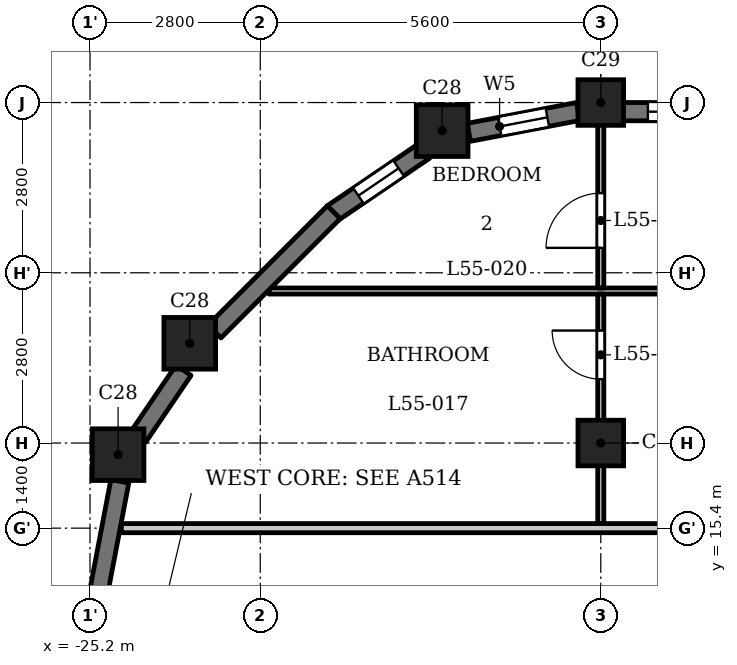
"""IFC4 building model, lengths in metres.
Left out: names, types, materials, properties, quantities, classifications, styles, units other than length and angle.
Written with IfcOpenShell. Run it as: python <this file> out.ifc"""

import sys

from ifc_helpers import new_model, si_unit, direction, frame, frame_2d, origin, origin_2d, place, context, subcontext, project, spatial, rectangle, extrude, element, fill, save


model = new_model("IFC4")
c1 = context("Model", 3, precision=1e-05, world=origin(), true_north=direction((0.0, 1.0)))
c2 = subcontext(c1, "Body", "Model", "MODEL_VIEW")
j1 = project(units=[si_unit("LENGTHUNIT", "METRE"), si_unit("PLANEANGLEUNIT", "RADIAN")], contexts=[c1])
p1 = place(None, origin())
s1 = spatial("IfcSite", under=j1, at=p1, CompositionType="ELEMENT")
p2 = place(p1, origin())
s2 = spatial("IfcBuilding", under=s1, at=p2, CompositionType="ELEMENT")
p3 = place(p2, frame((0.0, 0.0, 213.4)))
s3 = spatial("IfcBuildingStorey", under=s2, at=p3, CompositionType="ELEMENT", Elevation=213.4)
for number, where, z_axis, x_axis in (
    (1, (-19.409, 21.938, 0.0), (0.0, 0.0, 1.0), (1.0, 0.0, 0.0)),
    (2, (-23.56, 18.44, 0.0), (0.0, 0.0, 1.0), (1.0, 0.0, 0.0)),
    (3, (-24.738, 16.609, 0.0), (0.0, 0.0, 1.0), (1.0, 0.0, 0.0)),
):
    element("IfcColumn", number, at=place(p3, frame(where, z_axis=z_axis, x_axis=x_axis)), inside=s3, PredefinedType="COLUMN", context=c2, shape_type="SweptSolid", body=[
        extrude(rectangle(XDim=0.85, YDim=0.85, at=origin_2d()), origin(), (0.0, 0.0, 1.0), 3.5),
    ])
for number, where, z_axis, x_axis in (
    (4, (-16.8, 16.8, 0.0), (0.0, 0.0, 1.0), (1.0, 0.0, 0.0)),
    (5, (-16.8, 22.4, 0.0), (0.0, 0.0, 1.0), (1.0, 0.0, 0.0)),
):
    element("IfcColumn", number, at=place(p3, frame(where, z_axis=z_axis, x_axis=x_axis)), inside=s3, PredefinedType="COLUMN", context=c2, shape_type="SweptSolid", body=[
        extrude(rectangle(XDim=0.75, YDim=0.75, at=origin_2d()), origin(), (0.0, 0.0, 1.0), 3.5),
    ])
p4 = place(p3, frame((-14.425, 22.25, 0.0), z_axis=(0.0, 0.0, 1.0), x_axis=(-1.0, 0.0, 0.0)))
e6 = element("IfcWall", 6, at=p4, inside=s3, PredefinedType="SOLIDWALL", context=c2, shape_type="SweptSolid", body=[
    extrude(rectangle(XDim=2.0, YDim=0.3, at=frame_2d((1.0, 0.0))), origin(), (0.0, 0.0, 1.0), 2.5),
])
p5 = place(p4, frame((0.4, 0.0, 0.6)))
e7 = element("IfcOpeningElement", 7, at=p5, cuts=e6, PredefinedType="OPENING", context=c2, shape_type="SweptSolid", body=[
    extrude(rectangle(XDim=1.2, YDim=1.55, at=frame_2d((0.6, 0.775))), frame((0.0, 0.16, 0.0), z_axis=(0.0, -1.0, 0.0), x_axis=(1.0, 0.0, 0.0)), (0.0, 0.0, 1.0), 0.32),
])
p6 = place(p3, frame((-17.172, 22.253, 0.0), z_axis=(0.0, 0.0, 1.0), x_axis=(-0.982300037503, -0.187314271538, 0.0)))
e8 = element("IfcWall", 8, at=p6, inside=s3, PredefinedType="SOLIDWALL", context=c2, shape_type="SweptSolid", body=[
    extrude(rectangle(XDim=1.831, YDim=0.3, at=frame_2d((0.916, 0.0))), origin(), (0.0, 0.0, 1.0), 2.5),
])
p7 = place(p6, frame((0.516, 0.0, 0.6)))
e9 = element("IfcOpeningElement", 9, at=p7, cuts=e8, PredefinedType="OPENING", context=c2, shape_type="SweptSolid", body=[
    extrude(rectangle(XDim=0.8, YDim=1.55, at=frame_2d((0.4, 0.775))), frame((0.0, 0.16, 0.0), z_axis=(0.0, -1.0, 0.0), x_axis=(1.0, 0.0, 0.0)), (0.0, 0.0, 1.0), 0.32),
])
p8 = place(p3, frame((-19.698, 21.608, 0.0), z_axis=(0.0, 0.0, 1.0), x_axis=(-0.82705295608, -0.562124014644, 0.0)))
e10 = element("IfcWall", 10, at=p8, inside=s3, PredefinedType="SOLIDWALL", context=c2, shape_type="SweptSolid", body=[
    extrude(rectangle(XDim=1.831, YDim=0.3, at=frame_2d((0.916, 0.0))), origin(), (0.0, 0.0, 1.0), 2.5),
])
p9 = place(p8, frame((0.516, 0.0, 0.6)))
e11 = element("IfcOpeningElement", 11, at=p9, cuts=e10, PredefinedType="OPENING", context=c2, shape_type="SweptSolid", body=[
    extrude(rectangle(XDim=0.8, YDim=1.55, at=frame_2d((0.4, 0.775))), frame((0.0, 0.16, 0.0), z_axis=(0.0, -1.0, 0.0), x_axis=(1.0, 0.0, 0.0)), (0.0, 0.0, 1.0), 0.32),
])
p10 = place(p3, frame((-21.191, 20.597, 0.0), z_axis=(0.0, 0.0, 1.0), x_axis=(-0.707150767798, -0.707062791838, 0.0)))
e12 = element("IfcWall", 12, at=p10, inside=s3, PredefinedType="SOLIDWALL", context=c2, shape_type="SweptSolid", body=[
    extrude(rectangle(XDim=2.775, YDim=0.3, at=frame_2d((1.388, 0.0))), origin(), (0.0, 0.0, 1.0), 2.5),
])
p11 = place(p3, frame((-23.662, 17.996, 0.0), z_axis=(0.0, 0.0, 1.0), x_axis=(-0.562149004813, -0.827035970432, 0.0)))
e13 = element("IfcWall", 13, at=p11, inside=s3, PredefinedType="SOLIDWALL", context=c2, shape_type="SweptSolid", body=[
    extrude(rectangle(XDim=1.327, YDim=0.3, at=frame_2d((0.664, 0.0))), origin(), (0.0, 0.0, 1.0), 2.5),
])
p12 = place(p3, frame((-24.709, 16.171, 0.0), z_axis=(0.0, 0.0, 1.0), x_axis=(-0.187442908742, -0.982275499014, 0.0)))
e14 = element("IfcWall", 14, at=p12, inside=s3, PredefinedType="SOLIDWALL", context=c2, shape_type="SweptSolid", body=[
    extrude(rectangle(XDim=1.831, YDim=0.3, at=frame_2d((0.916, 0.0))), origin(), (0.0, 0.0, 1.0), 2.5),
])
p13 = place(p3, frame((-24.684, 15.4, 0.0), z_axis=(0.0, 0.0, 1.0), x_axis=(1.0, 0.0, 0.0)))
e15 = element("IfcWall", 15, at=p13, inside=s3, PredefinedType="PARTITIONING", context=c2, shape_type="SweptSolid", body=[
    extrude(rectangle(XDim=49.368, YDim=0.15, at=frame_2d((24.684, 0.0))), origin(), (0.0, 0.0, 1.0), 3.2),
])
p14 = place(p13, frame((17.434, 0.0, 0.0)))
e16 = element("IfcOpeningElement", 16, at=p14, cuts=e15, PredefinedType="OPENING", context=c2, shape_type="SweptSolid", body=[
    extrude(rectangle(XDim=1.0, YDim=2.1, at=frame_2d((0.5, 1.05))), frame((0.0, 0.085, 0.0), z_axis=(0.0, -1.0, 0.0), x_axis=(1.0, 0.0, 0.0)), (0.0, 0.0, 1.0), 0.17),
])
p15 = place(p13, frame((28.634, 0.0, 0.0)))
e17 = element("IfcOpeningElement", 17, at=p15, cuts=e15, PredefinedType="OPENING", context=c2, shape_type="SweptSolid", body=[
    extrude(rectangle(XDim=1.0, YDim=2.1, at=frame_2d((0.5, 1.05))), frame((0.0, 0.085, 0.0), z_axis=(0.0, -1.0, 0.0), x_axis=(1.0, 0.0, 0.0)), (0.0, 0.0, 1.0), 0.17),
])
p16 = place(p13, frame((47.225, 0.0, 0.0)))
e18 = element("IfcOpeningElement", 18, at=p16, cuts=e15, PredefinedType="OPENING", context=c2, shape_type="SweptSolid", body=[
    extrude(rectangle(XDim=1.0, YDim=2.1, at=frame_2d((0.5, 1.05))), frame((0.0, 0.085, 0.0), z_axis=(0.0, -1.0, 0.0), x_axis=(1.0, 0.0, 0.0)), (0.0, 0.0, 1.0), 0.17),
])
p17 = place(p3, frame((-22.256, 19.3, 0.0), z_axis=(0.0, 0.0, 1.0), x_axis=(1.0, 0.0, 0.0)))
e19 = element("IfcWall", 19, at=p17, inside=s3, PredefinedType="PARTITIONING", context=c2, shape_type="SweptSolid", body=[
    extrude(rectangle(XDim=44.511, YDim=0.1, at=frame_2d((22.256, 0.0))), origin(), (0.0, 0.0, 1.0), 3.2),
])
p18 = place(p17, frame((11.606, 0.0, 0.0)))
e20 = element("IfcOpeningElement", 20, at=p18, cuts=e19, PredefinedType="OPENING", context=c2, shape_type="SweptSolid", body=[
    extrude(rectangle(XDim=0.9, YDim=2.1, at=frame_2d((0.45, 1.05))), frame((0.0, 0.06, 0.0), z_axis=(0.0, -1.0, 0.0), x_axis=(1.0, 0.0, 0.0)), (0.0, 0.0, 1.0), 0.12),
])
p19 = place(p17, frame((9.506, 0.0, 0.0)))
e21 = element("IfcOpeningElement", 21, at=p19, cuts=e19, PredefinedType="OPENING", context=c2, shape_type="SweptSolid", body=[
    extrude(rectangle(XDim=0.9, YDim=2.1, at=frame_2d((0.45, 1.05))), frame((0.0, 0.06, 0.0), z_axis=(0.0, -1.0, 0.0), x_axis=(1.0, 0.0, 0.0)), (0.0, 0.0, 1.0), 0.12),
])
p20 = place(p17, frame((20.806, 0.0, 0.0)))
e22 = element("IfcOpeningElement", 22, at=p20, cuts=e19, PredefinedType="OPENING", context=c2, shape_type="SweptSolid", body=[
    extrude(rectangle(XDim=0.8, YDim=2.1, at=frame_2d((0.4, 1.05))), frame((0.0, 0.06, 0.0), z_axis=(0.0, -1.0, 0.0), x_axis=(1.0, 0.0, 0.0)), (0.0, 0.0, 1.0), 0.12),
])
p21 = place(p17, frame((26.306, 0.0, 0.0)))
e23 = element("IfcOpeningElement", 23, at=p21, cuts=e19, PredefinedType="OPENING", context=c2, shape_type="SweptSolid", body=[
    extrude(rectangle(XDim=0.9, YDim=2.1, at=frame_2d((0.45, 1.05))), frame((0.0, 0.06, 0.0), z_axis=(0.0, -1.0, 0.0), x_axis=(1.0, 0.0, 0.0)), (0.0, 0.0, 1.0), 0.12),
])
p22 = place(p17, frame((40.278, 0.0, 0.0)))
e24 = element("IfcOpeningElement", 24, at=p22, cuts=e19, PredefinedType="OPENING", context=c2, shape_type="SweptSolid", body=[
    extrude(rectangle(XDim=0.9, YDim=2.1, at=frame_2d((0.45, 1.05))), frame((0.0, 0.06, 0.0), z_axis=(0.0, -1.0, 0.0), x_axis=(1.0, 0.0, 0.0)), (0.0, 0.0, 1.0), 0.12),
])
p23 = place(p17, frame((36.756, 0.0, 0.0)))
e25 = element("IfcOpeningElement", 25, at=p23, cuts=e19, PredefinedType="OPENING", context=c2, shape_type="SweptSolid", body=[
    extrude(rectangle(XDim=0.9, YDim=2.1, at=frame_2d((0.45, 1.05))), frame((0.0, 0.06, 0.0), z_axis=(0.0, -1.0, 0.0), x_axis=(1.0, 0.0, 0.0)), (0.0, 0.0, 1.0), 0.12),
])
p24 = place(p3, frame((-16.8, 15.475, 0.0), z_axis=(0.0, 0.0, 1.0), x_axis=(0.0, 1.0, 0.0)))
e26 = element("IfcWall", 26, at=p24, inside=s3, PredefinedType="PARTITIONING", context=c2, shape_type="SweptSolid", body=[
    extrude(rectangle(XDim=3.775, YDim=0.1, at=frame_2d((1.887, 0.0))), origin(), (0.0, 0.0, 1.0), 2.55),
])
p25 = place(p24, frame((2.375, 0.0, 0.0)))
e27 = element("IfcOpeningElement", 27, at=p25, cuts=e26, PredefinedType="OPENING", context=c2, shape_type="SweptSolid", body=[
    extrude(rectangle(XDim=0.8, YDim=2.1, at=frame_2d((0.4, 1.05))), frame((0.0, 0.06, 0.0), z_axis=(0.0, -1.0, 0.0), x_axis=(1.0, 0.0, 0.0)), (0.0, 0.0, 1.0), 0.12),
])
p26 = place(p3, frame((-16.8, 19.35, 0.0), z_axis=(0.0, 0.0, 1.0), x_axis=(0.0, 1.0, 0.0)))
e28 = element("IfcWall", 28, at=p26, inside=s3, PredefinedType="PARTITIONING", context=c2, shape_type="SweptSolid", body=[
    extrude(rectangle(XDim=2.96, YDim=0.1, at=frame_2d((1.48, 0.0))), origin(), (0.0, 0.0, 1.0), 2.55),
])
p27 = place(p26, frame((0.66, 0.0, 0.0)))
e29 = element("IfcOpeningElement", 29, at=p27, cuts=e28, PredefinedType="OPENING", context=c2, shape_type="SweptSolid", body=[
    extrude(rectangle(XDim=0.9, YDim=2.1, at=frame_2d((0.45, 1.05))), frame((0.0, 0.06, 0.0), z_axis=(0.0, -1.0, 0.0), x_axis=(1.0, 0.0, 0.0)), (0.0, 0.0, 1.0), 0.12),
])
p28 = place(p25, origin())
e30 = element("IfcDoor", 30, at=p28, inside=s3, OperationType="SINGLE_SWING_LEFT", PredefinedType="DOOR", context=c2, shape_type="SweptSolid", body=[
    extrude(rectangle(XDim=0.8, YDim=2.1, at=frame_2d((0.4, 1.05))), frame((0.0, 0.025, 0.0), z_axis=(0.0, -1.0, 0.0), x_axis=(1.0, 0.0, 0.0)), (0.0, 0.0, 1.0), 0.05),
])
fill(e27, e30)
p29 = place(p27, origin())
e31 = element("IfcDoor", 31, at=p29, inside=s3, OperationType="SINGLE_SWING_RIGHT", PredefinedType="DOOR", context=c2, shape_type="SweptSolid", body=[
    extrude(rectangle(XDim=0.9, YDim=2.1, at=frame_2d((0.45, 1.05))), frame((0.0, 0.025, 0.0), z_axis=(0.0, -1.0, 0.0), x_axis=(1.0, 0.0, 0.0)), (0.0, 0.0, 1.0), 0.05),
])
fill(e29, e31)
p30 = place(p5, origin())
e32 = element("IfcWindow", 32, at=p30, inside=s3, PartitioningType="SINGLE_PANEL", PredefinedType="WINDOW", context=c2, shape_type="SweptSolid", body=[
    extrude(rectangle(XDim=1.2, YDim=1.55, at=frame_2d((0.6, 0.775))), frame((0.0, 0.03, 0.0), z_axis=(0.0, -1.0, 0.0), x_axis=(1.0, 0.0, 0.0)), (0.0, 0.0, 1.0), 0.06),
])
fill(e7, e32)
p31 = place(p7, origin())
e33 = element("IfcWindow", 33, at=p31, inside=s3, PartitioningType="SINGLE_PANEL", PredefinedType="WINDOW", context=c2, shape_type="SweptSolid", body=[
    extrude(rectangle(XDim=0.8, YDim=1.55, at=frame_2d((0.4, 0.775))), frame((0.0, 0.03, 0.0), z_axis=(0.0, -1.0, 0.0), x_axis=(1.0, 0.0, 0.0)), (0.0, 0.0, 1.0), 0.06),
])
fill(e9, e33)
p32 = place(p9, origin())
e34 = element("IfcWindow", 34, at=p32, inside=s3, PartitioningType="SINGLE_PANEL", PredefinedType="WINDOW", context=c2, shape_type="SweptSolid", body=[
    extrude(rectangle(XDim=0.8, YDim=1.55, at=frame_2d((0.4, 0.775))), frame((0.0, 0.03, 0.0), z_axis=(0.0, -1.0, 0.0), x_axis=(1.0, 0.0, 0.0)), (0.0, 0.0, 1.0), 0.06),
])
fill(e11, e34)
save(model, sys.argv[1])
